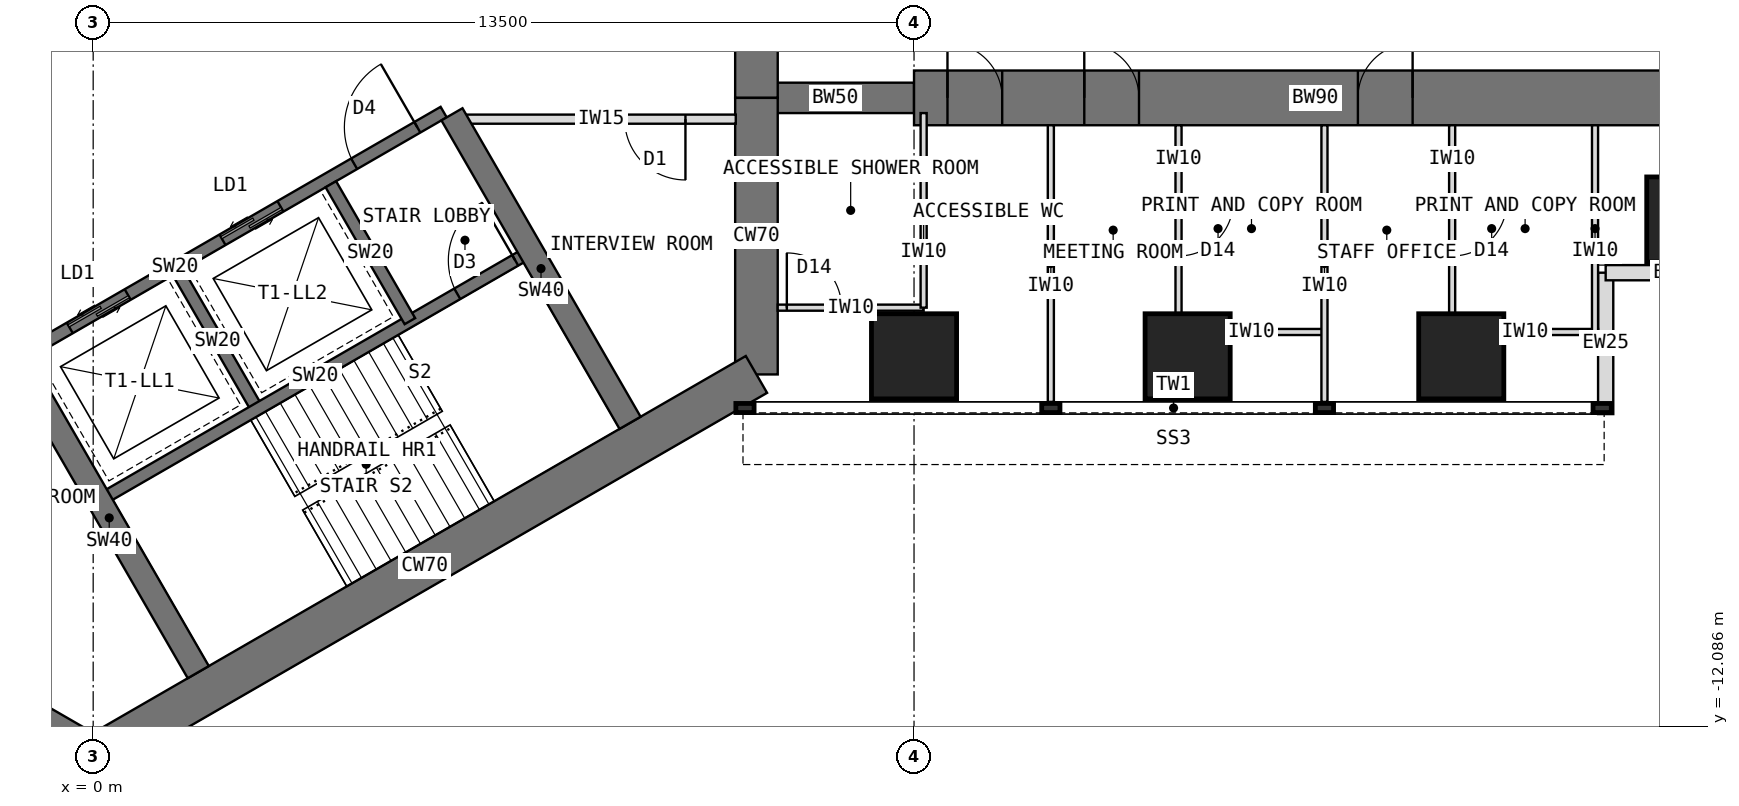
"""IFC4 building model, lengths in metres.
Left out: names, types, materials, properties, quantities, classifications, styles, units other than length and angle.
Written with IfcOpenShell. Run it as: python <this file> out.ifc"""

import sys

from ifc_helpers import new_model, si_unit, direction, frame, frame_2d, origin, origin_2d, place, context, subcontext, project, spatial, rectangle, extrude, element, fill, save


model = new_model("IFC4")
c1 = context("Model", 3, precision=1e-05, world=origin(), true_north=direction((0.0, 1.0)))
c2 = subcontext(c1, "Body", "Model", "MODEL_VIEW")
j1 = project(units=[si_unit("LENGTHUNIT", "METRE"), si_unit("PLANEANGLEUNIT", "RADIAN")], contexts=[c1])
p1 = place(None, origin())
s1 = spatial("IfcSite", under=j1, at=p1, CompositionType="ELEMENT")
p2 = place(p1, origin())
s2 = spatial("IfcBuilding", under=s1, at=p2, CompositionType="ELEMENT")
p3 = place(p2, frame((0.0, 0.0, 84.5)))
s3 = spatial("IfcBuildingStorey", under=s2, at=p3, CompositionType="ELEMENT", Elevation=84.5)
p4 = place(p3, frame((10.908, -6.298, 0.0), z_axis=(0.0, 0.0, 1.0), x_axis=(0.0, 1.0, 0.0)))
e1 = element("IfcWall", 1, at=p4, inside=s3, PredefinedType="SHEAR", context=c2, shape_type="SweptSolid", body=[
    extrude(rectangle(XDim=4.548, YDim=0.7, at=frame_2d((2.274, 0.0))), origin(), (0.0, 0.0, 1.0), 4.0),
])
p5 = place(p3, frame((10.908, -1.75, 0.0), z_axis=(0.0, 0.0, 1.0), x_axis=(0.0, 1.0, 0.0)))
e2 = element("IfcWall", 2, at=p5, inside=s3, PredefinedType="SHEAR", context=c2, shape_type="SweptSolid", body=[
    extrude(rectangle(XDim=3.5, YDim=0.7, at=frame_2d((1.75, 0.0))), origin(), (0.0, 0.0, 1.0), 4.0),
])
p6 = place(p5, frame((0.85, 0.0, 0.0)))
e3 = element("IfcOpeningElement", 3, at=p6, cuts=e2, PredefinedType="OPENING", context=c2, shape_type="SweptSolid", body=[
    extrude(rectangle(XDim=1.8, YDim=2.1, at=frame_2d((0.9, 1.05))), frame((0.0, 0.36, 0.0), z_axis=(0.0, -1.0, 0.0), x_axis=(1.0, 0.0, 0.0)), (0.0, 0.0, 1.0), 0.72),
])
p7 = place(p3, frame((-3.939, -10.322, 0.0), z_axis=(0.0, 0.0, 1.0), x_axis=(0.866011268655, -0.500024481964, 0.0)))
e4 = element("IfcWall", 4, at=p7, inside=s3, PredefinedType="SHEAR", context=c2, shape_type="SweptSolid", body=[
    extrude(rectangle(XDim=4.548, YDim=0.7, at=frame_2d((2.274, 0.0))), origin(), (0.0, 0.0, 1.0), 4.0),
])
p8 = place(p3, frame((0.0, -12.596, 0.0), z_axis=(0.0, 0.0, 1.0), x_axis=(0.866021940709, 0.500005998175, 0.0)))
e5 = element("IfcWall", 5, at=p8, inside=s3, PredefinedType="SHEAR", context=c2, shape_type="SweptSolid", body=[
    extrude(rectangle(XDim=12.596, YDim=0.7, at=frame_2d((6.298, 0.0))), origin(), (0.0, 0.0, 1.0), 4.0),
])
p9 = place(p3, frame((10.908, -1.75, 0.0), z_axis=(0.0, 0.0, 1.0), x_axis=(1.0, 0.0, 0.0)))
e6 = element("IfcWall", 6, at=p9, inside=s3, PredefinedType="SHEAR", context=c2, shape_type="SweptSolid", body=[
    extrude(rectangle(XDim=2.592, YDim=0.5, at=frame_2d((1.296, 0.0))), origin(), (0.0, 0.0, 1.0), 4.0),
])
p10 = place(p3, frame((13.5, -1.75, 0.0), z_axis=(0.0, 0.0, 1.0), x_axis=(1.0, 0.0, 0.0)))
e7 = element("IfcWall", 7, at=p10, inside=s3, PredefinedType="SHEAR", context=c2, shape_type="SweptSolid", body=[
    extrude(rectangle(XDim=13.2, YDim=0.9, at=frame_2d((6.6, 0.0))), origin(), (0.0, 0.0, 1.0), 4.0),
])
p11 = place(p10, frame((0.55, 0.0, 0.0)))
e8 = element("IfcOpeningElement", 8, at=p11, cuts=e7, PredefinedType="OPENING", context=c2, shape_type="SweptSolid", body=[
    extrude(rectangle(XDim=0.9, YDim=2.1, at=frame_2d((0.45, 1.05))), frame((0.0, 0.46, 0.0), z_axis=(0.0, -1.0, 0.0), x_axis=(1.0, 0.0, 0.0)), (0.0, 0.0, 1.0), 0.92),
])
p12 = place(p10, frame((2.8, 0.0, 0.0)))
e9 = element("IfcOpeningElement", 9, at=p12, cuts=e7, PredefinedType="OPENING", context=c2, shape_type="SweptSolid", body=[
    extrude(rectangle(XDim=0.9, YDim=2.1, at=frame_2d((0.45, 1.05))), frame((0.0, 0.46, 0.0), z_axis=(0.0, -1.0, 0.0), x_axis=(1.0, 0.0, 0.0)), (0.0, 0.0, 1.0), 0.92),
])
p13 = place(p10, frame((7.3, 0.0, 0.0)))
e10 = element("IfcOpeningElement", 10, at=p13, cuts=e7, PredefinedType="OPENING", context=c2, shape_type="SweptSolid", body=[
    extrude(rectangle(XDim=0.9, YDim=2.1, at=frame_2d((0.45, 1.05))), frame((0.0, 0.46, 0.0), z_axis=(0.0, -1.0, 0.0), x_axis=(1.0, 0.0, 0.0)), (0.0, 0.0, 1.0), 0.92),
])
for number, where, z_axis, x_axis in (
    (11, (13.5, -6.0, 0.0), (0.0, 0.0, 1.0), (1.0, 0.0, 0.0)),
    (12, (18.0, -6.0, 0.0), (0.0, 0.0, 1.0), (1.0, 0.0, 0.0)),
    (13, (22.5, -6.0, 0.0), (0.0, 0.0, 1.0), (1.0, 0.0, 0.0)),
    (14, (26.25, -3.75, 0.0), (0.0, 0.0, 1.0), (1.0, 0.0, 0.0)),
):
    element("IfcColumn", number, at=place(p3, frame(where, z_axis=z_axis, x_axis=x_axis)), inside=s3, PredefinedType="COLUMN", context=c2, shape_type="SweptSolid", body=[
        extrude(rectangle(XDim=1.4, YDim=1.4, at=origin_2d()), origin(), (0.0, 0.0, 1.0), 4.0),
    ])
for number, where, z_axis, x_axis in (
    (15, (24.875, -6.95, 0.0), (0.0, 0.0, 1.0), (0.0, 1.0, 0.0)),
    (16, (24.875, -4.625, 0.0), (0.0, 0.0, 1.0), (1.0, 0.0, 0.0)),
):
    element("IfcWall", number, at=place(p3, frame(where, z_axis=z_axis, x_axis=x_axis)), inside=s3, PredefinedType="STANDARD", context=c2, shape_type="SweptSolid", body=[
        extrude(rectangle(XDim=2.325, YDim=0.25, at=frame_2d((1.163, 0.0))), origin(), (0.0, 0.0, 1.0), 3.8),
    ])
p14 = place(p3, frame((-1.164, -5.984, 0.0), z_axis=(0.0, 0.0, 1.0), x_axis=(0.866026010844, 0.49999894854, 0.0)))
e17 = element("IfcWall", 17, at=p14, inside=s3, PredefinedType="SHEAR", context=c2, shape_type="SweptSolid", body=[
    extrude(rectangle(XDim=8.0, YDim=0.2, at=frame_2d((4.0, 0.0))), origin(), (0.0, 0.0, 1.0), 4.0),
])
p15 = place(p14, frame((6.3, 0.0, 0.0)))
e18 = element("IfcOpeningElement", 18, at=p15, cuts=e17, PredefinedType="OPENING", context=c2, shape_type="SweptSolid", body=[
    extrude(rectangle(XDim=1.2, YDim=2.1, at=frame_2d((0.6, 1.05))), frame((0.0, 0.11, 0.0), z_axis=(0.0, -1.0, 0.0), x_axis=(1.0, 0.0, 0.0)), (0.0, 0.0, 1.0), 0.22),
])
p16 = place(p14, frame((0.9, 0.0, 0.0)))
e19 = element("IfcOpeningElement", 19, at=p16, cuts=e17, PredefinedType="OPENING", context=c2, shape_type="SweptSolid", body=[
    extrude(rectangle(XDim=1.1, YDim=2.2, at=frame_2d((0.55, 1.1))), frame((0.0, 0.11, 0.0), z_axis=(0.0, -1.0, 0.0), x_axis=(1.0, 0.0, 0.0)), (0.0, 0.0, 1.0), 0.22),
])
p17 = place(p14, frame((3.8, 0.0, 0.0)))
e20 = element("IfcOpeningElement", 20, at=p17, cuts=e17, PredefinedType="OPENING", context=c2, shape_type="SweptSolid", body=[
    extrude(rectangle(XDim=1.1, YDim=2.2, at=frame_2d((0.55, 1.1))), frame((0.0, 0.11, 0.0), z_axis=(0.0, -1.0, 0.0), x_axis=(1.0, 0.0, 0.0)), (0.0, 0.0, 1.0), 0.22),
])
p18 = place(p3, frame((1.397, -4.62, 0.0), z_axis=(0.0, 0.0, 1.0), x_axis=(0.499936506574, -0.866062058628, 0.0)))
e21 = element("IfcWall", 21, at=p18, inside=s3, PredefinedType="SHEAR", context=c2, shape_type="SweptSolid", body=[
    extrude(rectangle(XDim=2.6, YDim=0.2, at=frame_2d((1.3, 0.0))), origin(), (0.0, 0.0, 1.0), 4.0),
])
p19 = place(p3, frame((3.909, -3.17, 0.0), z_axis=(0.0, 0.0, 1.0), x_axis=(0.49997716683, -0.86603858612, 0.0)))
e22 = element("IfcWall", 22, at=p19, inside=s3, PredefinedType="SHEAR", context=c2, shape_type="SweptSolid", body=[
    extrude(rectangle(XDim=2.6, YDim=0.2, at=frame_2d((1.3, 0.0))), origin(), (0.0, 0.0, 1.0), 4.0),
])
p20 = place(p3, frame((0.186, -8.322, 0.0), z_axis=(0.0, 0.0, 1.0), x_axis=(0.866026010844, 0.49999894854, 0.0)))
e23 = element("IfcWall", 23, at=p20, inside=s3, PredefinedType="SHEAR", context=c2, shape_type="SweptSolid", body=[
    extrude(rectangle(XDim=8.0, YDim=0.2, at=frame_2d((4.0, 0.0))), origin(), (0.0, 0.0, 1.0), 4.0),
])
p21 = place(p20, frame((6.7, 0.0, 0.0)))
e24 = element("IfcOpeningElement", 24, at=p21, cuts=e23, PredefinedType="OPENING", context=c2, shape_type="SweptSolid", body=[
    extrude(rectangle(XDim=1.1, YDim=2.1, at=frame_2d((0.55, 1.05))), frame((0.0, 0.11, 0.0), z_axis=(0.0, -1.0, 0.0), x_axis=(1.0, 0.0, 0.0)), (0.0, 0.0, 1.0), 0.22),
])
for number, where, z_axis, x_axis in (
    (25, (5.901, -2.02, 0.0), (0.0, 0.0, 1.0), (0.5, -0.866, 0.0)),
    (26, (-1.201, -6.12, 0.0), (0.0, 0.0, 1.0), (0.5, -0.866, 0.0)),
):
    element("IfcWall", number, at=place(p3, frame(where, z_axis=z_axis, x_axis=x_axis)), inside=s3, PredefinedType="SHEAR", context=c2, shape_type="SweptSolid", body=[
        extrude(rectangle(XDim=5.858, YDim=0.4, at=frame_2d((2.929, 0.0))), origin(), (0.0, 0.0, 1.0), 4.0),
    ])
for number, where, z_axis, x_axis in (
    (27, (15.75, -2.2, 0.0), (0.0, 0.0, 1.0), (0.0, -1.0, 0.0)),
    (28, (20.25, -2.2, 0.0), (0.0, 0.0, 1.0), (0.0, -1.0, 0.0)),
):
    element("IfcWall", number, at=place(p3, frame(where, z_axis=z_axis, x_axis=x_axis)), inside=s3, PredefinedType="PARTITIONING", context=c2, shape_type="SweptSolid", body=[
        extrude(rectangle(XDim=4.55, YDim=0.1, at=frame_2d((2.275, 0.0))), origin(), (0.0, 0.0, 1.0), 3.8),
    ])
p22 = place(p3, frame((17.85, -5.6, 0.0), z_axis=(0.0, 0.0, 1.0), x_axis=(1.0, 0.0, 0.0)))
e29 = element("IfcWall", 29, at=p22, inside=s3, PredefinedType="PARTITIONING", context=c2, shape_type="SweptSolid", body=[
    extrude(rectangle(XDim=2.4, YDim=0.1, at=frame_2d((1.2, 0.0))), origin(), (0.0, 0.0, 1.0), 3.8),
])
p23 = place(p3, frame((17.85, -2.2, 0.0), z_axis=(0.0, 0.0, 1.0), x_axis=(0.0, -1.0, 0.0)))
e30 = element("IfcWall", 30, at=p23, inside=s3, PredefinedType="PARTITIONING", context=c2, shape_type="SweptSolid", body=[
    extrude(rectangle(XDim=3.4, YDim=0.1, at=frame_2d((1.7, 0.0))), origin(), (0.0, 0.0, 1.0), 3.8),
])
p24 = place(p23, frame((1.25, 0.0, 0.0)))
e31 = element("IfcOpeningElement", 31, at=p24, cuts=e30, PredefinedType="OPENING", context=c2, shape_type="SweptSolid", body=[
    extrude(rectangle(XDim=0.9, YDim=2.1, at=frame_2d((0.45, 1.05))), frame((0.0, 0.06, 0.0), z_axis=(0.0, -1.0, 0.0), x_axis=(1.0, 0.0, 0.0)), (0.0, 0.0, 1.0), 0.12),
])
p25 = place(p3, frame((22.35, -5.6, 0.0), z_axis=(0.0, 0.0, 1.0), x_axis=(1.0, 0.0, 0.0)))
e32 = element("IfcWall", 32, at=p25, inside=s3, PredefinedType="PARTITIONING", context=c2, shape_type="SweptSolid", body=[
    extrude(rectangle(XDim=2.4, YDim=0.1, at=frame_2d((1.2, 0.0))), origin(), (0.0, 0.0, 1.0), 3.8),
])
p26 = place(p3, frame((22.35, -2.2, 0.0), z_axis=(0.0, 0.0, 1.0), x_axis=(0.0, -1.0, 0.0)))
e33 = element("IfcWall", 33, at=p26, inside=s3, PredefinedType="PARTITIONING", context=c2, shape_type="SweptSolid", body=[
    extrude(rectangle(XDim=3.4, YDim=0.1, at=frame_2d((1.7, 0.0))), origin(), (0.0, 0.0, 1.0), 3.8),
])
p27 = place(p26, frame((1.25, 0.0, 0.0)))
e34 = element("IfcOpeningElement", 34, at=p27, cuts=e33, PredefinedType="OPENING", context=c2, shape_type="SweptSolid", body=[
    extrude(rectangle(XDim=0.9, YDim=2.1, at=frame_2d((0.45, 1.05))), frame((0.0, 0.06, 0.0), z_axis=(0.0, -1.0, 0.0), x_axis=(1.0, 0.0, 0.0)), (0.0, 0.0, 1.0), 0.12),
])
p28 = place(p3, frame((24.7, -2.2, 0.0), z_axis=(0.0, 0.0, 1.0), x_axis=(0.0, -1.0, 0.0)))
e35 = element("IfcWall", 35, at=p28, inside=s3, PredefinedType="PARTITIONING", context=c2, shape_type="SweptSolid", body=[
    extrude(rectangle(XDim=3.4, YDim=0.1, at=frame_2d((1.7, 0.0))), origin(), (0.0, 0.0, 1.0), 3.8),
])
p29 = place(p3, frame((11.258, -5.2, 0.0), z_axis=(0.0, 0.0, 1.0), x_axis=(1.0, 0.0, 0.0)))
e36 = element("IfcWall", 36, at=p29, inside=s3, PredefinedType="PARTITIONING", context=c2, shape_type="SweptSolid", body=[
    extrude(rectangle(XDim=2.4, YDim=0.1, at=frame_2d((1.2, 0.0))), origin(), (0.0, 0.0, 1.0), 3.8),
])
p30 = place(p29, frame((0.15, 0.0, 0.0)))
e37 = element("IfcOpeningElement", 37, at=p30, cuts=e36, PredefinedType="OPENING", context=c2, shape_type="SweptSolid", body=[
    extrude(rectangle(XDim=0.9, YDim=2.1, at=frame_2d((0.45, 1.05))), frame((0.0, 0.06, 0.0), z_axis=(0.0, -1.0, 0.0), x_axis=(1.0, 0.0, 0.0)), (0.0, 0.0, 1.0), 0.12),
])
p31 = place(p3, frame((13.658, -2.0, 0.0), z_axis=(0.0, 0.0, 1.0), x_axis=(0.0, -1.0, 0.0)))
e38 = element("IfcWall", 38, at=p31, inside=s3, PredefinedType="PARTITIONING", context=c2, shape_type="SweptSolid", body=[
    extrude(rectangle(XDim=3.2, YDim=0.1, at=frame_2d((1.6, 0.0))), origin(), (0.0, 0.0, 1.0), 3.8),
])
p32 = place(p3, frame((10.568, -2.1, 0.0), z_axis=(0.0, 0.0, 1.0), x_axis=(-1.0, 0.0, 0.0)))
e39 = element("IfcWall", 39, at=p32, inside=s3, PredefinedType="PARTITIONING", context=c2, shape_type="SweptSolid", body=[
    extrude(rectangle(XDim=4.426, YDim=0.15, at=frame_2d((2.213, 0.0))), origin(), (0.0, 0.0, 1.0), 3.8),
])
p33 = place(p32, frame((0.828, 0.0, 0.0)))
e40 = element("IfcOpeningElement", 40, at=p33, cuts=e39, PredefinedType="OPENING", context=c2, shape_type="SweptSolid", body=[
    extrude(rectangle(XDim=1.0, YDim=2.1, at=frame_2d((0.5, 1.05))), frame((0.0, 0.085, 0.0), z_axis=(0.0, -1.0, 0.0), x_axis=(1.0, 0.0, 0.0)), (0.0, 0.0, 1.0), 0.17),
])
p34 = place(p15, origin())
e41 = element("IfcDoor", 41, at=p34, inside=s3, OperationType="SINGLE_SWING_RIGHT", PredefinedType="DOOR", context=c2, shape_type="SweptSolid", body=[
    extrude(rectangle(XDim=1.2, YDim=2.1, at=frame_2d((0.6, 1.05))), frame((0.0, 0.025, 0.0), z_axis=(0.0, -1.0, 0.0), x_axis=(1.0, 0.0, 0.0)), (0.0, 0.0, 1.0), 0.05),
])
fill(e18, e41)
p35 = place(p16, origin())
e42 = element("IfcDoor", 42, at=p35, inside=s3, OperationType="DOUBLE_DOOR_SLIDING", PredefinedType="DOOR", context=c2, shape_type="SweptSolid", body=[
    extrude(rectangle(XDim=1.1, YDim=2.2, at=frame_2d((0.55, 1.1))), frame((0.0, 0.025, 0.0), z_axis=(0.0, -1.0, 0.0), x_axis=(1.0, 0.0, 0.0)), (0.0, 0.0, 1.0), 0.05),
])
fill(e19, e42)
p36 = place(p17, origin())
e43 = element("IfcDoor", 43, at=p36, inside=s3, OperationType="DOUBLE_DOOR_SLIDING", PredefinedType="DOOR", context=c2, shape_type="SweptSolid", body=[
    extrude(rectangle(XDim=1.1, YDim=2.2, at=frame_2d((0.55, 1.1))), frame((0.0, 0.025, 0.0), z_axis=(0.0, -1.0, 0.0), x_axis=(1.0, 0.0, 0.0)), (0.0, 0.0, 1.0), 0.05),
])
fill(e20, e43)
p37 = place(p21, origin())
e44 = element("IfcDoor", 44, at=p37, inside=s3, OperationType="SINGLE_SWING_RIGHT", PredefinedType="DOOR", context=c2, shape_type="SweptSolid", body=[
    extrude(rectangle(XDim=1.1, YDim=2.1, at=frame_2d((0.55, 1.05))), frame((0.0, 0.025, 0.0), z_axis=(0.0, -1.0, 0.0), x_axis=(1.0, 0.0, 0.0)), (0.0, 0.0, 1.0), 0.05),
])
fill(e24, e44)
p38 = place(p24, origin())
e45 = element("IfcDoor", 45, at=p38, inside=s3, OperationType="SINGLE_SWING_LEFT", PredefinedType="DOOR", context=c2, shape_type="SweptSolid", body=[
    extrude(rectangle(XDim=0.9, YDim=2.1, at=frame_2d((0.45, 1.05))), frame((0.0, 0.025, 0.0), z_axis=(0.0, -1.0, 0.0), x_axis=(1.0, 0.0, 0.0)), (0.0, 0.0, 1.0), 0.05),
])
fill(e31, e45)
p39 = place(p27, origin())
e46 = element("IfcDoor", 46, at=p39, inside=s3, OperationType="SINGLE_SWING_LEFT", PredefinedType="DOOR", context=c2, shape_type="SweptSolid", body=[
    extrude(rectangle(XDim=0.9, YDim=2.1, at=frame_2d((0.45, 1.05))), frame((0.0, 0.025, 0.0), z_axis=(0.0, -1.0, 0.0), x_axis=(1.0, 0.0, 0.0)), (0.0, 0.0, 1.0), 0.05),
])
fill(e34, e46)
p40 = place(p30, origin())
e47 = element("IfcDoor", 47, at=p40, inside=s3, OperationType="SINGLE_SWING_LEFT", PredefinedType="DOOR", context=c2, shape_type="SweptSolid", body=[
    extrude(rectangle(XDim=0.9, YDim=2.1, at=frame_2d((0.45, 1.05))), frame((0.0, 0.025, 0.0), z_axis=(0.0, -1.0, 0.0), x_axis=(1.0, 0.0, 0.0)), (0.0, 0.0, 1.0), 0.05),
])
fill(e37, e47)
p41 = place(p33, origin())
e48 = element("IfcDoor", 48, at=p41, inside=s3, OperationType="SINGLE_SWING_LEFT", PredefinedType="DOOR", context=c2, shape_type="SweptSolid", body=[
    extrude(rectangle(XDim=1.0, YDim=2.1, at=frame_2d((0.5, 1.05))), frame((0.0, 0.025, 0.0), z_axis=(0.0, -1.0, 0.0), x_axis=(1.0, 0.0, 0.0)), (0.0, 0.0, 1.0), 0.05),
])
fill(e40, e48)
p42 = place(p11, origin())
e49 = element("IfcDoor", 49, at=p42, inside=s3, OperationType="SINGLE_SWING_LEFT", PredefinedType="DOOR", context=c2, shape_type="SweptSolid", body=[
    extrude(rectangle(XDim=0.82, YDim=2.06, at=frame_2d((0.45, 1.03))), frame((0.0, 0.025, 0.0), z_axis=(0.0, -1.0, 0.0), x_axis=(1.0, 0.0, 0.0)), (0.0, 0.0, 1.0), 0.05),
    extrude(rectangle(XDim=0.04, YDim=2.1, at=frame_2d((0.02, 1.05))), frame((0.0, 0.45, 0.0), z_axis=(0.0, -1.0, 0.0), x_axis=(1.0, 0.0, 0.0)), (0.0, 0.0, 1.0), 0.899),
    extrude(rectangle(XDim=0.04, YDim=2.1, at=frame_2d((0.88, 1.05))), frame((0.0, 0.45, 0.0), z_axis=(0.0, -1.0, 0.0), x_axis=(1.0, 0.0, 0.0)), (0.0, 0.0, 1.0), 0.899),
    extrude(rectangle(XDim=0.82, YDim=0.04, at=frame_2d((0.45, 2.08))), frame((0.0, 0.45, 0.0), z_axis=(0.0, -1.0, 0.0), x_axis=(1.0, 0.0, 0.0)), (0.0, 0.0, 1.0), 0.899),
])
fill(e8, e49)
p43 = place(p12, origin())
e50 = element("IfcDoor", 50, at=p43, inside=s3, OperationType="SINGLE_SWING_LEFT", PredefinedType="DOOR", context=c2, shape_type="SweptSolid", body=[
    extrude(rectangle(XDim=0.82, YDim=2.06, at=frame_2d((0.45, 1.03))), frame((0.0, 0.025, 0.0), z_axis=(0.0, -1.0, 0.0), x_axis=(1.0, 0.0, 0.0)), (0.0, 0.0, 1.0), 0.05),
    extrude(rectangle(XDim=0.04, YDim=2.1, at=frame_2d((0.02, 1.05))), frame((0.0, 0.45, 0.0), z_axis=(0.0, -1.0, 0.0), x_axis=(1.0, 0.0, 0.0)), (0.0, 0.0, 1.0), 0.899),
    extrude(rectangle(XDim=0.04, YDim=2.1, at=frame_2d((0.88, 1.05))), frame((0.0, 0.45, 0.0), z_axis=(0.0, -1.0, 0.0), x_axis=(1.0, 0.0, 0.0)), (0.0, 0.0, 1.0), 0.899),
    extrude(rectangle(XDim=0.82, YDim=0.04, at=frame_2d((0.45, 2.08))), frame((0.0, 0.45, 0.0), z_axis=(0.0, -1.0, 0.0), x_axis=(1.0, 0.0, 0.0)), (0.0, 0.0, 1.0), 0.899),
])
fill(e9, e50)
p44 = place(p13, origin())
e51 = element("IfcDoor", 51, at=p44, inside=s3, OperationType="SINGLE_SWING_RIGHT", PredefinedType="DOOR", context=c2, shape_type="SweptSolid", body=[
    extrude(rectangle(XDim=0.82, YDim=2.06, at=frame_2d((0.45, 1.03))), frame((0.0, 0.025, 0.0), z_axis=(0.0, -1.0, 0.0), x_axis=(1.0, 0.0, 0.0)), (0.0, 0.0, 1.0), 0.05),
    extrude(rectangle(XDim=0.04, YDim=2.1, at=frame_2d((0.02, 1.05))), frame((0.0, 0.45, 0.0), z_axis=(0.0, -1.0, 0.0), x_axis=(1.0, 0.0, 0.0)), (0.0, 0.0, 1.0), 0.899),
    extrude(rectangle(XDim=0.04, YDim=2.1, at=frame_2d((0.88, 1.05))), frame((0.0, 0.45, 0.0), z_axis=(0.0, -1.0, 0.0), x_axis=(1.0, 0.0, 0.0)), (0.0, 0.0, 1.0), 0.899),
    extrude(rectangle(XDim=0.82, YDim=0.04, at=frame_2d((0.45, 2.08))), frame((0.0, 0.45, 0.0), z_axis=(0.0, -1.0, 0.0), x_axis=(1.0, 0.0, 0.0)), (0.0, 0.0, 1.0), 0.899),
])
fill(e10, e51)
save(model, sys.argv[1])
